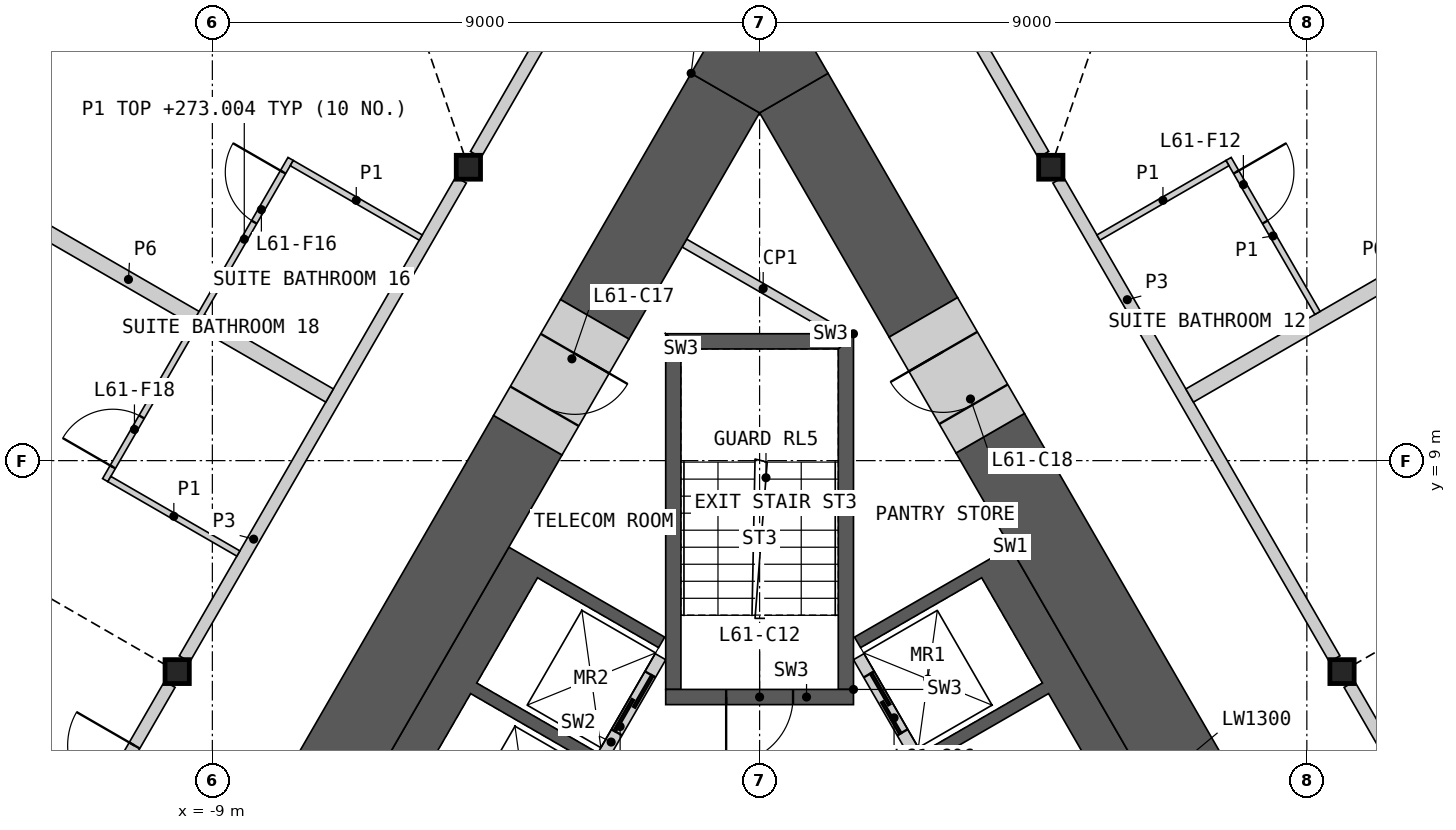
"""IFC4 building model, lengths in metres.
Left out: names, types, materials, properties, quantities, classifications, styles, units other than length and angle.
Written with IfcOpenShell. Run it as: python <this file> out.ifc"""

import sys

from ifc_helpers import new_model, si_unit, direction, frame, frame_2d, origin, origin_2d, place, context, subcontext, project, spatial, polyline, rectangle, i_section, outline, extrude, element, fill, save


model = new_model("IFC4")
c1 = context("Model", 3, precision=1e-05, world=origin(), true_north=direction((0.0, 1.0)))
c2 = subcontext(c1, "Body", "Model", "MODEL_VIEW")
j1 = project(units=[si_unit("LENGTHUNIT", "METRE"), si_unit("PLANEANGLEUNIT", "RADIAN")], contexts=[c1])
p1 = place(None, origin())
s1 = spatial("IfcSite", under=j1, at=p1, CompositionType="ELEMENT")
p2 = place(p1, origin())
s2 = spatial("IfcBuilding", under=s1, at=p2, CompositionType="ELEMENT")
p3 = place(p2, frame((0.0, 0.0, 270.6)))
s3 = spatial("IfcBuildingStorey", under=s2, at=p3, CompositionType="ELEMENT", Elevation=270.6)
for number, where, z_axis, x_axis in (
    (1, (-4.789, 13.825, 0.0), (0.0, 0.0, 1.0), (1.0, 0.0, 0.0)),
    (2, (-9.578, 5.53, 0.0), (0.0, 0.0, 1.0), (1.0, 0.0, 0.0)),
    (3, (9.578, 5.53, 0.0), (0.0, 0.0, 1.0), (1.0, 0.0, 0.0)),
    (4, (4.789, 13.825, 0.0), (0.0, 0.0, 1.0), (1.0, 0.0, 0.0)),
):
    element("IfcColumn", number, at=place(p3, frame(where, z_axis=z_axis, x_axis=x_axis)), inside=s3, PredefinedType="COLUMN", context=c2, shape_type="SweptSolid", body=[
        extrude(i_section(OverallWidth=0.399, OverallDepth=0.393, WebThickness=0.023, FlangeThickness=0.037, at=origin_2d()), origin(), (0.0, 0.0, 1.0), 3.6),
    ])
p4 = place(p3, origin())
e5 = element("IfcWall", 5, at=p4, inside=s3, PredefinedType="SHEAR", context=c2, shape_type="SweptSolid", body=[
    extrude(outline(polyline([(4.124, 7.577), (8.624, -0.217), (8.231, -0.444), (6.061, -1.697), (5.96, -1.524), (7.952, -0.374), (4.752, 5.169), (2.76, 4.019), (2.66, 4.192), (4.652, 5.342), (3.652, 7.074), (1.66, 5.924), (1.561, 6.097), (3.731, 7.35), (4.124, 7.577)])), origin(), (0.0, 0.0, 1.0), 3.25),
])
p5 = place(p3, frame((5.817, -1.476, 0.0), z_axis=(0.0, 0.0, 1.0), x_axis=(-0.500002616675, 0.866023893041, 0.0)))
e6 = element("IfcWall", 6, at=p5, inside=s3, PredefinedType="SOLIDWALL", context=c2, shape_type="SweptSolid", body=[
    extrude(rectangle(XDim=8.373, YDim=0.2, at=frame_2d((4.187, 0.0))), origin(), (0.0, 0.0, 1.0), 3.25),
])
p6 = place(p5, frame((2.637, 0.0, 0.0)))
e7 = element("IfcOpeningElement", 7, at=p6, cuts=e6, PredefinedType="OPENING", context=c2, shape_type="SweptSolid", body=[
    extrude(rectangle(XDim=0.9, YDim=2.1, at=frame_2d((0.45, 1.05))), frame((0.0, 0.11, 0.0), z_axis=(0.0, -1.0, 0.0), x_axis=(1.0, 0.0, 0.0)), (0.0, 0.0, 1.0), 0.22),
])
p7 = place(p5, frame((6.937, 0.0, 0.0)))
e8 = element("IfcOpeningElement", 8, at=p7, cuts=e6, PredefinedType="OPENING", context=c2, shape_type="SweptSolid", body=[
    extrude(rectangle(XDim=1.1, YDim=2.1, at=frame_2d((0.55, 1.05))), frame((0.0, 0.11, 0.0), z_axis=(0.0, -1.0, 0.0), x_axis=(1.0, 0.0, 0.0)), (0.0, 0.0, 1.0), 0.22),
])
p8 = place(p3, origin())
e9 = element("IfcWall", 9, at=p8, inside=s3, PredefinedType="SHEAR", context=c2, shape_type="SweptSolid", body=[
    extrude(outline(polyline([(-7.524, 1.688), (-4.124, 7.577), (-3.731, 7.35), (-1.561, 6.097), (-1.66, 5.924), (-3.652, 7.074), (-4.652, 5.342), (-2.66, 4.192), (-2.76, 4.019), (-4.752, 5.169), (-5.752, 3.437), (-3.76, 2.287), (-3.861, 2.113), (-5.852, 3.263), (-6.852, 1.531), (-4.861, 0.381), (-4.96, 0.208), (-7.131, 1.461), (-7.524, 1.688)])), origin(), (0.0, 0.0, 1.0), 3.25),
])
p9 = place(p3, frame((-1.631, 5.776, 0.0), z_axis=(0.0, 0.0, 1.0), x_axis=(-0.499992876559, -0.866029516466, 0.0)))
e10 = element("IfcWall", 10, at=p9, inside=s3, PredefinedType="SOLIDWALL", context=c2, shape_type="SweptSolid", body=[
    extrude(rectangle(XDim=6.486, YDim=0.2, at=frame_2d((3.243, 0.0))), origin(), (0.0, 0.0, 1.0), 3.25),
])
p10 = place(p9, frame((0.337, 0.0, 0.0)))
e11 = element("IfcOpeningElement", 11, at=p10, cuts=e10, PredefinedType="OPENING", context=c2, shape_type="SweptSolid", body=[
    extrude(rectangle(XDim=1.1, YDim=2.1, at=frame_2d((0.55, 1.05))), frame((0.0, 0.11, 0.0), z_axis=(0.0, -1.0, 0.0), x_axis=(1.0, 0.0, 0.0)), (0.0, 0.0, 1.0), 0.22),
])
p11 = place(p9, frame((2.537, 0.0, 0.0)))
e12 = element("IfcOpeningElement", 12, at=p11, cuts=e10, PredefinedType="OPENING", context=c2, shape_type="SweptSolid", body=[
    extrude(rectangle(XDim=1.1, YDim=2.1, at=frame_2d((0.55, 1.05))), frame((0.0, 0.11, 0.0), z_axis=(0.0, -1.0, 0.0), x_axis=(1.0, 0.0, 0.0)), (0.0, 0.0, 1.0), 0.22),
])
p12 = place(p3, origin())
e13 = element("IfcWall", 13, at=p12, inside=s3, PredefinedType="SHEAR", context=c2, shape_type="SweptSolid", body=[
    extrude(outline(polyline([(1.544, 5.237), (1.544, 11.087), (1.294, 10.837), (1.294, 5.237), (1.544, 5.237)])), origin(), (0.0, 0.0, 1.0), 3.25),
])
p13 = place(p3, origin())
e14 = element("IfcWall", 14, at=p13, inside=s3, PredefinedType="SHEAR", context=c2, shape_type="SweptSolid", body=[
    extrude(outline(polyline([(1.544, 11.087), (-1.544, 11.087), (-1.294, 10.837), (1.294, 10.837), (1.544, 11.087)])), origin(), (0.0, 0.0, 1.0), 3.25),
])
p14 = place(p3, origin())
e15 = element("IfcWall", 15, at=p14, inside=s3, PredefinedType="SHEAR", context=c2, shape_type="SweptSolid", body=[
    extrude(outline(polyline([(-1.294, 10.837), (-1.544, 11.087), (-1.544, 5.237), (-1.294, 5.237), (-1.294, 10.837)])), origin(), (0.0, 0.0, 1.0), 3.25),
])
p15 = place(p3, frame((1.544, 5.112, 0.0), z_axis=(0.0, 0.0, 1.0), x_axis=(-1.0, 0.0, 0.0)))
e16 = element("IfcWall", 16, at=p15, inside=s3, PredefinedType="SHEAR", context=c2, shape_type="SweptSolid", body=[
    extrude(rectangle(XDim=3.088, YDim=0.25, at=frame_2d((1.544, 0.0))), origin(), (0.0, 0.0, 1.0), 3.25),
])
p16 = place(p15, frame((0.994, 0.0, 0.0)))
e17 = element("IfcOpeningElement", 17, at=p16, cuts=e16, PredefinedType="OPENING", context=c2, shape_type="SweptSolid", body=[
    extrude(rectangle(XDim=1.1, YDim=2.1, at=frame_2d((0.55, 1.05))), frame((0.0, 0.135, 0.0), z_axis=(0.0, -1.0, 0.0), x_axis=(1.0, 0.0, 0.0)), (0.0, 0.0, 1.0), 0.27),
])
p17 = place(p3, frame((-1.237, 12.578, 0.0), z_axis=(0.0, 0.0, 1.0), x_axis=(0.866045649925, -0.499964931016, 0.0)))
e18 = element("IfcWall", 18, at=p17, inside=s3, PredefinedType="PARTITIONING", context=c2, shape_type="SweptSolid", body=[
    extrude(rectangle(XDim=2.992, YDim=0.15, at=frame_2d((1.496, 0.0))), origin(), (0.0, 0.0, 1.0), 3.25),
])
p18 = place(p3, frame((10.062, -1.408, 0.0), z_axis=(0.0, 0.0, 1.0), x_axis=(-0.500000545805, 0.866025088663, 0.0)))
e19 = element("IfcWall", 19, at=p18, inside=s3, PredefinedType="SHEAR", context=c2, shape_type="SweptSolid", body=[
    extrude(rectangle(XDim=12.539, YDim=1.3, at=frame_2d((6.27, 0.0))), origin(), (0.0, 0.0, 1.0), 3.25),
])
p19 = place(p3, frame((2.693, 11.356, 0.0), z_axis=(0.0, 0.0, 1.0), x_axis=(-0.50002837164, 0.866009022791, 0.0)))
e20 = element("IfcWall", 20, at=p19, inside=s3, PredefinedType="SHEAR", context=c2, shape_type="SweptSolid", body=[
    extrude(rectangle(XDim=4.26, YDim=1.3, at=frame_2d((2.13, 0.0))), origin(), (0.0, 0.0, 1.0), 3.25),
])
p20 = place(p3, frame((-3.812, 9.418, 0.0), z_axis=(0.0, 0.0, 1.0), x_axis=(-0.499995037753, -0.86602826872, 0.0)))
e21 = element("IfcWall", 21, at=p20, inside=s3, PredefinedType="SHEAR", context=c2, shape_type="SweptSolid", body=[
    extrude(rectangle(XDim=8.451, YDim=1.3, at=frame_2d((4.225, 0.0))), origin(), (0.0, 0.0, 1.0), 3.25),
])
p21 = place(p3, frame((-0.563, 15.045, 0.0), z_axis=(0.0, 0.0, 1.0), x_axis=(-0.499994567278, -0.866028540345, 0.0)))
e22 = element("IfcWall", 22, at=p21, inside=s3, PredefinedType="SHEAR", context=c2, shape_type="SweptSolid", body=[
    extrude(rectangle(XDim=4.297, YDim=1.3, at=frame_2d((2.149, 0.0))), origin(), (0.0, 0.0, 1.0), 3.25),
])
p22 = place(p3, origin())
e23 = element("IfcWall", 23, at=p22, inside=s3, PredefinedType="SHEAR", context=c2, shape_type="SweptSolid", body=[
    extrude(outline(polyline([(-1.126, 15.371), (0.0, 17.321), (1.126, 15.371), (0.0, 14.72), (-1.126, 15.371)])), origin(), (0.0, 0.0, 1.0), 3.25),
])
p23 = place(p3, frame((-2.712, 11.324, 0.0), z_axis=(0.0, 0.0, 1.0), x_axis=(-0.499946605688, -0.86605622881, 0.0)))
e24 = element("IfcWall", 24, at=p23, inside=s3, PredefinedType="SHEAR", context=c2, shape_type="SweptSolid", body=[
    extrude(rectangle(XDim=2.2, YDim=1.3, at=frame_2d((1.1, 0.0))), origin(), (0.0, 0.0, 1.0), 3.25),
])
p24 = place(p23, frame((0.65, 0.0, 0.0)))
e25 = element("IfcOpeningElement", 25, at=p24, cuts=e24, PredefinedType="OPENING", context=c2, shape_type="SweptSolid", body=[
    extrude(rectangle(XDim=1.0, YDim=2.1, at=frame_2d((0.5, 1.05))), frame((0.0, 0.66, 0.0), z_axis=(0.0, -1.0, 0.0), x_axis=(1.0, 0.0, 0.0)), (0.0, 0.0, 1.0), 1.32),
])
p25 = place(p3, frame((3.793, 9.451, 0.0), z_axis=(0.0, 0.0, 1.0), x_axis=(-0.499946605688, 0.86605622881, 0.0)))
e26 = element("IfcWall", 26, at=p25, inside=s3, PredefinedType="SHEAR", context=c2, shape_type="SweptSolid", body=[
    extrude(rectangle(XDim=2.2, YDim=1.3, at=frame_2d((1.1, 0.0))), origin(), (0.0, 0.0, 1.0), 3.25),
])
p26 = place(p25, frame((0.55, 0.0, 0.0)))
e27 = element("IfcOpeningElement", 27, at=p26, cuts=e26, PredefinedType="OPENING", context=c2, shape_type="SweptSolid", body=[
    extrude(rectangle(XDim=1.0, YDim=2.1, at=frame_2d((0.5, 1.05))), frame((0.0, 0.66, 0.0), z_axis=(0.0, -1.0, 0.0), x_axis=(1.0, 0.0, 0.0)), (0.0, 0.0, 1.0), 1.32),
])
p27 = place(p3, frame((-14.247, -2.556, 0.0), z_axis=(0.0, 0.0, 1.0), x_axis=(0.49998193945, 0.866035830797, 0.0)))
e28 = element("IfcWall", 28, at=p27, inside=s3, PredefinedType="PARTITIONING", context=c2, shape_type="SweptSolid", body=[
    extrude(rectangle(XDim=9.094, YDim=0.2, at=frame_2d((4.547, 0.0))), origin(), (0.0, 0.0, 1.0), 3.25),
])
p28 = place(p27, frame((6.833, 0.0, 0.0)))
e29 = element("IfcOpeningElement", 29, at=p28, cuts=e28, PredefinedType="OPENING", context=c2, shape_type="SweptSolid", body=[
    extrude(rectangle(XDim=1.1, YDim=2.1, at=frame_2d((0.55, 1.05))), frame((0.0, 0.11, 0.0), z_axis=(0.0, -1.0, 0.0), x_axis=(1.0, 0.0, 0.0)), (0.0, 0.0, 1.0), 0.22),
])
p29 = place(p3, frame((9.699, 5.321, 0.0), z_axis=(0.0, 0.0, 1.0), x_axis=(0.49998193945, -0.866035830797, 0.0)))
e30 = element("IfcWall", 30, at=p29, inside=s3, PredefinedType="PARTITIONING", context=c2, shape_type="SweptSolid", body=[
    extrude(rectangle(XDim=9.094, YDim=0.2, at=frame_2d((4.547, 0.0))), origin(), (0.0, 0.0, 1.0), 3.25),
])
p30 = place(p29, frame((1.162, 0.0, 0.0)))
e31 = element("IfcOpeningElement", 31, at=p30, cuts=e30, PredefinedType="OPENING", context=c2, shape_type="SweptSolid", body=[
    extrude(rectangle(XDim=1.1, YDim=2.1, at=frame_2d((0.55, 1.05))), frame((0.0, 0.11, 0.0), z_axis=(0.0, -1.0, 0.0), x_axis=(1.0, 0.0, 0.0)), (0.0, 0.0, 1.0), 0.22),
])
for number, where, z_axis, x_axis in (
    (32, (4.91, 13.616, 0.0), (0.0, 0.0, 1.0), (0.5, -0.866, 0.0)),
    (33, (-9.458, 5.74, 0.0), (0.0, 0.0, 1.0), (0.5, 0.866, 0.0)),
):
    element("IfcWall", number, at=place(p3, frame(where, z_axis=z_axis, x_axis=x_axis)), inside=s3, PredefinedType="PARTITIONING", context=c2, shape_type="SweptSolid", body=[
        extrude(rectangle(XDim=9.095, YDim=0.2, at=frame_2d((4.547, 0.0))), origin(), (0.0, 0.0, 1.0), 3.25),
    ])
for number, where, z_axis, x_axis in (
    (34, (7.073, 10.071, 0.0), (0.0, 0.0, 1.0), (0.866, 0.5, 0.0)),
    (35, (-13.687, 13.889, 0.0), (0.0, 0.0, 1.0), (0.866, -0.5, 0.0)),
):
    element("IfcWall", number, at=place(p3, frame(where, z_axis=z_axis, x_axis=x_axis)), inside=s3, PredefinedType="PARTITIONING", context=c2, shape_type="SweptSolid", body=[
        extrude(rectangle(XDim=7.638, YDim=0.25, at=frame_2d((3.819, 0.0))), origin(), (0.0, 0.0, 1.0), 2.404),
    ])
p31 = place(p3, frame((-4.668, 14.035, 0.0), z_axis=(0.0, 0.0, 1.0), x_axis=(0.499984524817, 0.866034338201, 0.0)))
e36 = element("IfcWall", 36, at=p31, inside=s3, PredefinedType="PARTITIONING", context=c2, shape_type="SweptSolid", body=[
    extrude(rectangle(XDim=5.51, YDim=0.2, at=frame_2d((2.755, 0.0))), origin(), (0.0, 0.0, 1.0), 3.25),
])
p32 = place(p31, frame((4.06, 0.0, 0.0)))
e37 = element("IfcOpeningElement", 37, at=p32, cuts=e36, PredefinedType="OPENING", context=c2, shape_type="SweptSolid", body=[
    extrude(rectangle(XDim=1.1, YDim=2.1, at=frame_2d((0.55, 1.05))), frame((0.0, 0.11, 0.0), z_axis=(0.0, -1.0, 0.0), x_axis=(1.0, 0.0, 0.0)), (0.0, 0.0, 1.0), 0.22),
])
p33 = place(p3, frame((1.913, 18.807, 0.0), z_axis=(0.0, 0.0, 1.0), x_axis=(0.499984524817, -0.866034338201, 0.0)))
e38 = element("IfcWall", 38, at=p33, inside=s3, PredefinedType="PARTITIONING", context=c2, shape_type="SweptSolid", body=[
    extrude(rectangle(XDim=5.51, YDim=0.2, at=frame_2d((2.755, 0.0))), origin(), (0.0, 0.0, 1.0), 3.25),
])
p34 = place(p33, frame((0.35, 0.0, 0.0)))
e39 = element("IfcOpeningElement", 39, at=p34, cuts=e38, PredefinedType="OPENING", context=c2, shape_type="SweptSolid", body=[
    extrude(rectangle(XDim=1.1, YDim=2.1, at=frame_2d((0.55, 1.05))), frame((0.0, 0.11, 0.0), z_axis=(0.0, -1.0, 0.0), x_axis=(1.0, 0.0, 0.0)), (0.0, 0.0, 1.0), 0.22),
])
p35 = place(p3, frame((-10.762, 8.679, 0.0), z_axis=(0.0, 0.0, 1.0), x_axis=(0.500008851346, 0.866020293397, 0.0)))
e40 = element("IfcWall", 40, at=p35, inside=s3, PredefinedType="PARTITIONING", context=c2, shape_type="SweptSolid", body=[
    extrude(rectangle(XDim=6.1, YDim=0.1, at=frame_2d((3.05, 0.0))), origin(), (0.0, 0.0, 1.0), 2.404),
])
p36 = place(p35, frame((4.9, 0.0, 0.0)))
e41 = element("IfcOpeningElement", 41, at=p36, cuts=e40, PredefinedType="OPENING", context=c2, shape_type="SweptSolid", body=[
    extrude(rectangle(XDim=0.95, YDim=2.1, at=frame_2d((0.475, 1.05))), frame((0.0, 0.06, 0.0), z_axis=(0.0, -1.0, 0.0), x_axis=(1.0, 0.0, 0.0)), (0.0, 0.0, 1.0), 0.12),
])
p37 = place(p35, frame((0.25, 0.0, 0.0)))
e42 = element("IfcOpeningElement", 42, at=p37, cuts=e40, PredefinedType="OPENING", context=c2, shape_type="SweptSolid", body=[
    extrude(rectangle(XDim=0.95, YDim=2.1, at=frame_2d((0.475, 1.05))), frame((0.0, 0.06, 0.0), z_axis=(0.0, -1.0, 0.0), x_axis=(1.0, 0.0, 0.0)), (0.0, 0.0, 1.0), 0.12),
])
p38 = place(p3, frame((7.712, 13.962, 0.0), z_axis=(0.0, 0.0, 1.0), x_axis=(0.500062034277, -0.865989585315, 0.0)))
e43 = element("IfcWall", 43, at=p38, inside=s3, PredefinedType="PARTITIONING", context=c2, shape_type="SweptSolid", body=[
    extrude(rectangle(XDim=2.925, YDim=0.1, at=frame_2d((1.462, 0.0))), origin(), (0.0, 0.0, 1.0), 2.404),
])
p39 = place(p38, frame((0.25, 0.0, 0.0)))
e44 = element("IfcOpeningElement", 44, at=p39, cuts=e43, PredefinedType="OPENING", context=c2, shape_type="SweptSolid", body=[
    extrude(rectangle(XDim=0.95, YDim=2.1, at=frame_2d((0.475, 1.05))), frame((0.0, 0.06, 0.0), z_axis=(0.0, -1.0, 0.0), x_axis=(1.0, 0.0, 0.0)), (0.0, 0.0, 1.0), 0.12),
])
p40 = place(p3, frame((-10.694, 8.698, 0.0), z_axis=(0.0, 0.0, 1.0), x_axis=(0.866032905446, -0.499987006516, 0.0)))
e45 = element("IfcWall", 45, at=p40, inside=s3, PredefinedType="PARTITIONING", context=c2, shape_type="SweptSolid", body=[
    extrude(rectangle(XDim=2.45, YDim=0.1, at=frame_2d((1.225, 0.0))), origin(), (0.0, 0.0, 1.0), 2.404),
])
for number, where, z_axis, x_axis in (
    (46, (5.573, 12.669, 0.0), (0.0, 0.0, 1.0), (0.866, 0.5, 0.0)),
    (47, (-7.694, 13.894, 0.0), (0.0, 0.0, 1.0), (0.866, -0.5, 0.0)),
):
    element("IfcWall", number, at=place(p3, frame(where, z_axis=z_axis, x_axis=x_axis)), inside=s3, PredefinedType="PARTITIONING", context=c2, shape_type="SweptSolid", body=[
        extrude(rectangle(XDim=2.45, YDim=0.1, at=frame_2d((1.225, 0.0))), origin(), (0.0, 0.0, 1.0), 2.404),
    ])
p41 = place(p7, origin())
e48 = element("IfcDoor", 48, at=p41, inside=s3, OperationType="SLIDING_TO_LEFT", PredefinedType="DOOR", context=c2, shape_type="SweptSolid", body=[
    extrude(rectangle(XDim=1.1, YDim=2.1, at=frame_2d((0.55, 1.05))), frame((0.0, 0.025, 0.0), z_axis=(0.0, -1.0, 0.0), x_axis=(1.0, 0.0, 0.0)), (0.0, 0.0, 1.0), 0.05),
])
fill(e8, e48)
p42 = place(p10, origin())
e49 = element("IfcDoor", 49, at=p42, inside=s3, OperationType="SLIDING_TO_LEFT", PredefinedType="DOOR", context=c2, shape_type="SweptSolid", body=[
    extrude(rectangle(XDim=1.1, YDim=2.1, at=frame_2d((0.55, 1.05))), frame((0.0, 0.025, 0.0), z_axis=(0.0, -1.0, 0.0), x_axis=(1.0, 0.0, 0.0)), (0.0, 0.0, 1.0), 0.05),
])
fill(e11, e49)
p43 = place(p16, origin())
e50 = element("IfcDoor", 50, at=p43, inside=s3, OperationType="SINGLE_SWING_RIGHT", PredefinedType="DOOR", context=c2, shape_type="SweptSolid", body=[
    extrude(rectangle(XDim=1.1, YDim=2.1, at=frame_2d((0.55, 1.05))), frame((0.0, 0.025, 0.0), z_axis=(0.0, -1.0, 0.0), x_axis=(1.0, 0.0, 0.0)), (0.0, 0.0, 1.0), 0.05),
])
fill(e17, e50)
p44 = place(p24, origin())
e51 = element("IfcDoor", 51, at=p44, inside=s3, OperationType="SINGLE_SWING_LEFT", PredefinedType="DOOR", context=c2, shape_type="SweptSolid", body=[
    extrude(rectangle(XDim=1.0, YDim=2.1, at=frame_2d((0.5, 1.05))), frame((0.0, 0.405, 0.0), z_axis=(0.0, -1.0, 0.0), x_axis=(1.0, 0.0, 0.0)), (0.0, 0.0, 1.0), 0.05),
])
fill(e25, e51)
p45 = place(p26, origin())
e52 = element("IfcDoor", 52, at=p45, inside=s3, OperationType="SINGLE_SWING_RIGHT", PredefinedType="DOOR", context=c2, shape_type="SweptSolid", body=[
    extrude(rectangle(XDim=1.0, YDim=2.1, at=frame_2d((0.5, 1.05))), frame((0.0, 0.405, 0.0), z_axis=(0.0, -1.0, 0.0), x_axis=(1.0, 0.0, 0.0)), (0.0, 0.0, 1.0), 0.05),
])
fill(e27, e52)
p46 = place(p39, origin())
e53 = element("IfcDoor", 53, at=p46, inside=s3, OperationType="SINGLE_SWING_LEFT", PredefinedType="DOOR", context=c2, shape_type="SweptSolid", body=[
    extrude(rectangle(XDim=0.95, YDim=2.1, at=frame_2d((0.475, 1.05))), frame((0.0, 0.025, 0.0), z_axis=(0.0, -1.0, 0.0), x_axis=(1.0, 0.0, 0.0)), (0.0, 0.0, 1.0), 0.05),
])
fill(e44, e53)
p47 = place(p36, origin())
e54 = element("IfcDoor", 54, at=p47, inside=s3, OperationType="SINGLE_SWING_RIGHT", PredefinedType="DOOR", context=c2, shape_type="SweptSolid", body=[
    extrude(rectangle(XDim=0.95, YDim=2.1, at=frame_2d((0.475, 1.05))), frame((0.0, 0.025, 0.0), z_axis=(0.0, -1.0, 0.0), x_axis=(1.0, 0.0, 0.0)), (0.0, 0.0, 1.0), 0.05),
])
fill(e41, e54)
p48 = place(p28, origin())
e55 = element("IfcDoor", 55, at=p48, inside=s3, OperationType="SINGLE_SWING_RIGHT", PredefinedType="DOOR", context=c2, shape_type="SweptSolid", body=[
    extrude(rectangle(XDim=1.1, YDim=2.1, at=frame_2d((0.55, 1.05))), frame((0.0, 0.025, 0.0), z_axis=(0.0, -1.0, 0.0), x_axis=(1.0, 0.0, 0.0)), (0.0, 0.0, 1.0), 0.05),
])
fill(e29, e55)
p49 = place(p37, origin())
e56 = element("IfcDoor", 56, at=p49, inside=s3, OperationType="SINGLE_SWING_LEFT", PredefinedType="DOOR", context=c2, shape_type="SweptSolid", body=[
    extrude(rectangle(XDim=0.95, YDim=2.1, at=frame_2d((0.475, 1.05))), frame((0.0, 0.025, 0.0), z_axis=(0.0, -1.0, 0.0), x_axis=(1.0, 0.0, 0.0)), (0.0, 0.0, 1.0), 0.05),
])
fill(e42, e56)
save(model, sys.argv[1])
